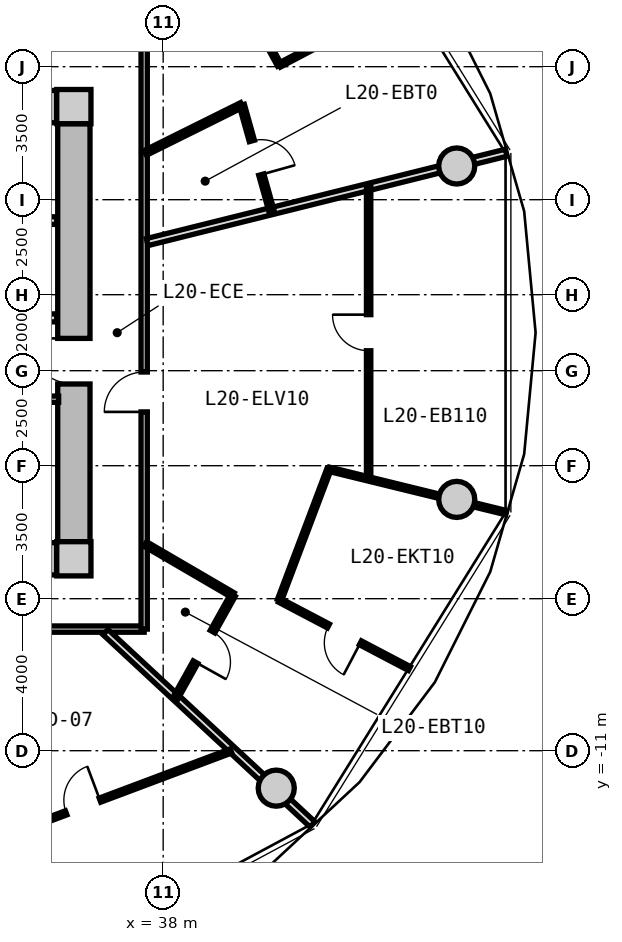
"""IFC4 building model, lengths in metres.
Left out: names, types, materials, properties, quantities, classifications, styles, units other than length and angle.
Written with IfcOpenShell. Run it as: python <this file> out.ifc"""

import sys

from ifc_helpers import new_model, si_unit, direction, frame, frame_2d, origin, origin_2d, place, context, subcontext, project, spatial, rectangle, circle, extrude, source, transform, mapped, element, fill, save


model = new_model("IFC4")
c1 = context("Model", 3, precision=1e-05, world=origin(), true_north=direction((0.0, 1.0)))
c2 = subcontext(c1, "Body", "Model", "MODEL_VIEW")
j1 = project(units=[si_unit("LENGTHUNIT", "METRE"), si_unit("PLANEANGLEUNIT", "RADIAN")], contexts=[c1])
p1 = place(None, origin())
s1 = spatial("IfcSite", under=j1, at=p1, CompositionType="ELEMENT")
p2 = place(p1, origin())
s2 = spatial("IfcBuilding", under=s1, at=p2, CompositionType="ELEMENT")
p3 = place(p2, frame((0.0, 0.0, 67.35)))
s3 = spatial("IfcBuildingStorey", under=s2, at=p3, CompositionType="ELEMENT", Elevation=67.35)
m1 = source(origin(), c2, "Body", "SweptSolid", [
    extrude(rectangle(XDim=0.9, YDim=0.9, at=origin_2d()), origin(), (0.0, 0.0, 1.0), 3.05),
])
for number, where, z_axis, x_axis in (
    (1, (35.65, -5.95, 0.0), (0.0, 0.0, 1.0), (1.0, 0.0, 0.0)),
    (2, (35.65, 5.95, 0.0), (0.0, 0.0, 1.0), (1.0, 0.0, 0.0)),
):
    element("IfcColumn", number, at=place(p3, frame(where, z_axis=z_axis, x_axis=x_axis)), inside=s3, PredefinedType="COLUMN", context=c2, shape_type="MappedRepresentation", body=[
        mapped(m1, transform((0.0, 0.0, 0.0), x_axis=(1.0, 0.0, 0.0), y_axis=(0.0, 1.0, 0.0), z_axis=(0.0, 0.0, 1.0), scale=1.0)),
    ])
m2 = source(origin(), c2, "Body", "SweptSolid", [
    extrude(rectangle(XDim=14.4, YDim=0.85, at=frame_2d((7.2, 0.0))), origin(), (0.0, 0.0, 1.0), 2.79),
])
for number, where, z_axis, x_axis in (
    (3, (20.8, 5.95, 0.0), (0.0, 0.0, 1.0), (1.0, 0.0, 0.0)),
    (4, (35.2, -5.95, 0.0), (0.0, 0.0, 1.0), (-1.0, 0.0, 0.0)),
):
    element("IfcWall", number, at=place(p3, frame(where, z_axis=z_axis, x_axis=x_axis)), inside=s3, PredefinedType="SHEAR", context=c2, shape_type="MappedRepresentation", body=[
        mapped(m2, transform((0.0, 0.0, 0.0), x_axis=(1.0, 0.0, 0.0), y_axis=(0.0, 1.0, 0.0), z_axis=(0.0, 0.0, 1.0), scale=1.0)),
    ])
m3 = source(origin(), c2, "Body", "SweptSolid", [
    extrude(rectangle(XDim=11.0, YDim=0.85, at=frame_2d((5.5, 0.0))), origin(), (0.0, 0.0, 1.0), 2.79),
])
p4 = place(p3, frame((35.65, 5.5, 0.0), z_axis=(0.0, 0.0, 1.0), x_axis=(0.0, -1.0, 0.0)))
e5 = element("IfcWall", 5, at=p4, inside=s3, PredefinedType="SHEAR", context=c2, shape_type="MappedRepresentation", body=[
    mapped(m3, transform((0.0, 0.0, 0.0), x_axis=(1.0, 0.0, 0.0), y_axis=(0.0, 1.0, 0.0), z_axis=(0.0, 0.0, 1.0), scale=1.0)),
])
p5 = place(p4, frame((5.65, 0.0, 0.0)))
e6 = element("IfcOpeningElement", 6, at=p5, cuts=e5, PredefinedType="OPENING", context=c2, shape_type="SweptSolid", body=[
    extrude(rectangle(XDim=1.2, YDim=2.15, at=frame_2d((0.6, 1.075))), frame((0.0, 0.435, 0.0), z_axis=(0.0, -1.0, 0.0), x_axis=(1.0, 0.0, 0.0)), (0.0, 0.0, 1.0), 0.87),
])
m4 = source(origin(), c2, "Body", "SweptSolid", [
    extrude(circle(Radius=0.475, at=origin_2d()), origin(), (0.0, 0.0, 1.0), 3.05),
])
for number, where, z_axis, x_axis in (
    (7, (45.725, 4.387, 0.0), (0.0, 0.0, 1.0), (1.0, 0.0, 0.0)),
    (8, (40.975, -11.985, 0.0), (0.0, 0.0, 1.0), (1.0, 0.0, 0.0)),
    (9, (45.725, -4.387, 0.0), (0.0, 0.0, 1.0), (1.0, 0.0, 0.0)),
):
    element("IfcColumn", number, at=place(p3, frame(where, z_axis=z_axis, x_axis=x_axis)), inside=s3, PredefinedType="COLUMN", context=c2, shape_type="MappedRepresentation", body=[
        mapped(m4, transform((0.0, 0.0, 0.0), x_axis=(1.0, 0.0, 0.0), y_axis=(0.0, 1.0, 0.0), z_axis=(0.0, 0.0, 1.0), scale=1.0)),
    ])
m5 = source(origin(), c2, "Body", "SweptSolid", [
    extrude(rectangle(XDim=3.2, YDim=0.2, at=frame_2d((1.6, 0.0))), origin(), (0.0, 0.0, 1.0), 2.775),
])
p6 = place(p3, frame((32.0, 2.95, 0.0), z_axis=(0.0, 0.0, 1.0), x_axis=(1.0, 0.0, 0.0)))
e10 = element("IfcWall", 10, at=p6, inside=s3, PredefinedType="PARTITIONING", context=c2, shape_type="MappedRepresentation", body=[
    mapped(m5, transform((0.0, 0.0, 0.0), x_axis=(1.0, 0.0, 0.0), y_axis=(0.0, 1.0, 0.0), z_axis=(0.0, 0.0, 1.0), scale=1.0)),
])
m6 = source(origin(), c2, "Body", "SweptSolid", [
    extrude(rectangle(XDim=6.66, YDim=0.21, at=frame_2d((3.33, 0.0))), origin(), (0.0, 0.0, 1.0), 2.775),
])
p7 = place(p3, frame((28.54, 0.39, 0.0), z_axis=(0.0, 0.0, 1.0), x_axis=(1.0, 0.0, 0.0)))
e11 = element("IfcWall", 11, at=p7, inside=s3, PredefinedType="PARTITIONING", context=c2, shape_type="MappedRepresentation", body=[
    mapped(m6, transform((0.0, 0.0, 0.0), x_axis=(1.0, 0.0, 0.0), y_axis=(0.0, 1.0, 0.0), z_axis=(0.0, 0.0, 1.0), scale=1.0)),
])
p8 = place(p7, frame((1.0, 0.0, 0.0)))
e12 = element("IfcOpeningElement", 12, at=p8, cuts=e11, PredefinedType="OPENING", context=c2, shape_type="SweptSolid", body=[
    extrude(rectangle(XDim=1.2, YDim=2.15, at=frame_2d((0.6, 1.075))), frame((0.0, 0.115, 0.0), z_axis=(0.0, -1.0, 0.0), x_axis=(1.0, 0.0, 0.0)), (0.0, 0.0, 1.0), 0.23),
])
m7 = source(origin(), c2, "Body", "SweptSolid", [
    extrude(rectangle(XDim=2.7, YDim=0.165, at=frame_2d((1.35, 0.0))), origin(), (0.0, 0.0, 1.0), 2.775),
])
p9 = place(p3, frame((32.55, -1.75, 0.0), z_axis=(0.0, 0.0, 1.0), x_axis=(1.0, 0.0, 0.0)))
e13 = element("IfcWall", 13, at=p9, inside=s3, PredefinedType="PARTITIONING", context=c2, shape_type="MappedRepresentation", body=[
    mapped(m7, transform((0.0, 0.0, 0.0), x_axis=(1.0, 0.0, 0.0), y_axis=(0.0, 1.0, 0.0), z_axis=(0.0, 0.0, 1.0), scale=1.0)),
])
p10 = place(p9, frame((0.222, 0.0, 0.0)))
e14 = element("IfcOpeningElement", 14, at=p10, cuts=e13, PredefinedType="OPENING", context=c2, shape_type="SweptSolid", body=[
    extrude(rectangle(XDim=0.925, YDim=2.1, at=frame_2d((0.462, 1.05))), frame((0.0, 0.093, 0.0), z_axis=(0.0, -1.0, 0.0), x_axis=(1.0, 0.0, 0.0)), (0.0, 0.0, 1.0), 0.185),
])
p11 = place(p9, frame((1.522, 0.0, 0.0)))
e15 = element("IfcOpeningElement", 15, at=p11, cuts=e13, PredefinedType="OPENING", context=c2, shape_type="SweptSolid", body=[
    extrude(rectangle(XDim=0.925, YDim=2.1, at=frame_2d((0.462, 1.05))), frame((0.0, 0.093, 0.0), z_axis=(0.0, -1.0, 0.0), x_axis=(1.0, 0.0, 0.0)), (0.0, 0.0, 1.0), 0.185),
])
m8 = source(origin(), c2, "Body", "SweptSolid", [
    extrude(rectangle(XDim=19.0, YDim=0.165, at=frame_2d((9.5, 0.0))), origin(), (0.0, 0.0, 1.0), 2.775),
])
p12 = place(p3, frame((37.5, -7.8, 0.0), z_axis=(0.0, 0.0, 1.0), x_axis=(-1.0, 0.0, 0.0)))
e16 = element("IfcWall", 16, at=p12, inside=s3, PredefinedType="PARTITIONING", context=c2, shape_type="MappedRepresentation", body=[
    mapped(m8, transform((0.0, 0.0, 0.0), x_axis=(1.0, 0.0, 0.0), y_axis=(0.0, 1.0, 0.0), z_axis=(0.0, 0.0, 1.0), scale=1.0)),
])
p13 = place(p12, frame((14.72, 0.0, 0.0)))
e17 = element("IfcOpeningElement", 17, at=p13, cuts=e16, PredefinedType="OPENING", context=c2, shape_type="SweptSolid", body=[
    extrude(rectangle(XDim=1.05, YDim=2.15, at=frame_2d((0.525, 1.075))), frame((0.0, 0.093, 0.0), z_axis=(0.0, -1.0, 0.0), x_axis=(1.0, 0.0, 0.0)), (0.0, 0.0, 1.0), 0.185),
])
p14 = place(p12, frame((4.847, 0.0, 0.0)))
e18 = element("IfcOpeningElement", 18, at=p14, cuts=e16, PredefinedType="OPENING", context=c2, shape_type="SweptSolid", body=[
    extrude(rectangle(XDim=1.05, YDim=2.15, at=frame_2d((0.525, 1.075))), frame((0.0, 0.093, 0.0), z_axis=(0.0, -1.0, 0.0), x_axis=(1.0, 0.0, 0.0)), (0.0, 0.0, 1.0), 0.185),
])
m9 = source(origin(), c2, "Body", "SweptSolid", [
    extrude(rectangle(XDim=15.6, YDim=0.165, at=frame_2d((7.8, 0.0))), origin(), (0.0, 0.0, 1.0), 2.775),
])
p15 = place(p3, frame((37.5, 7.8, 0.0), z_axis=(0.0, 0.0, 1.0), x_axis=(0.0, -1.0, 0.0)))
e19 = element("IfcWall", 19, at=p15, inside=s3, PredefinedType="PARTITIONING", context=c2, shape_type="MappedRepresentation", body=[
    mapped(m9, transform((0.0, 0.0, 0.0), x_axis=(1.0, 0.0, 0.0), y_axis=(0.0, 1.0, 0.0), z_axis=(0.0, 0.0, 1.0), scale=1.0)),
])
p16 = place(p15, frame((8.835, 0.0, 0.0)))
e20 = element("IfcOpeningElement", 20, at=p16, cuts=e19, PredefinedType="OPENING", context=c2, shape_type="SweptSolid", body=[
    extrude(rectangle(XDim=1.05, YDim=2.15, at=frame_2d((0.525, 1.075))), frame((0.0, 0.093, 0.0), z_axis=(0.0, -1.0, 0.0), x_axis=(1.0, 0.0, 0.0)), (0.0, 0.0, 1.0), 0.185),
])
m10 = source(origin(), c2, "Body", "SweptSolid", [
    extrude(rectangle(XDim=7.435, YDim=0.19, at=frame_2d((3.717, 0.0))), origin(), (0.0, 0.0, 1.0), 2.225),
])
p17 = place(p3, frame((36.483, -7.88, 0.0), z_axis=(0.0, 0.0, 1.0), x_axis=(0.732651956848, -0.680603489652, 0.0)))
e21 = element("IfcWall", 21, at=p17, inside=s3, PredefinedType="PARTITIONING", context=c2, shape_type="MappedRepresentation", body=[
    mapped(m10, transform((0.0, 0.0, 0.0), x_axis=(1.0, 0.0, 0.0), y_axis=(0.0, 1.0, 0.0), z_axis=(0.0, 0.0, 1.0), scale=1.0)),
])
m11 = source(origin(), c2, "Body", "SweptSolid", [
    extrude(rectangle(XDim=8.32, YDim=0.115, at=frame_2d((4.16, 0.0))), origin(), (0.0, 0.0, 1.0), 2.775),
])
p18 = place(p3, frame((31.997, -13.93, 0.0), z_axis=(0.0, 0.0, 1.0), x_axis=(0.936180763098, 0.351518959382, 0.0)))
e22 = element("IfcWall", 22, at=p18, inside=s3, PredefinedType="PARTITIONING", context=c2, shape_type="MappedRepresentation", body=[
    mapped(m11, transform((0.0, 0.0, 0.0), x_axis=(1.0, 0.0, 0.0), y_axis=(0.0, 1.0, 0.0), z_axis=(0.0, 0.0, 1.0), scale=1.0)),
])
p19 = place(p18, frame((3.685, 0.0, 0.0)))
e23 = element("IfcOpeningElement", 23, at=p19, cuts=e22, PredefinedType="OPENING", context=c2, shape_type="SweptSolid", body=[
    extrude(rectangle(XDim=0.95, YDim=2.1, at=frame_2d((0.475, 1.05))), frame((0.0, 0.067, 0.0), z_axis=(0.0, -1.0, 0.0), x_axis=(1.0, 0.0, 0.0)), (0.0, 0.0, 1.0), 0.135),
])
m12 = source(origin(), c2, "Body", "SweptSolid", [
    extrude(rectangle(XDim=9.737, YDim=0.19, at=frame_2d((4.869, 0.0))), origin(), (0.0, 0.0, 1.0), 2.225),
])
p20 = place(p3, frame((37.58, 2.385, 0.0), z_axis=(0.0, 0.0, 1.0), x_axis=(0.970392716238, 0.241532557375, 0.0)))
e24 = element("IfcWall", 24, at=p20, inside=s3, PredefinedType="PARTITIONING", context=c2, shape_type="MappedRepresentation", body=[
    mapped(m12, transform((0.0, 0.0, 0.0), x_axis=(1.0, 0.0, 0.0), y_axis=(0.0, 1.0, 0.0), z_axis=(0.0, 0.0, 1.0), scale=1.0)),
])
m13 = source(origin(), c2, "Body", "SweptSolid", [
    extrude(rectangle(XDim=7.709, YDim=0.115, at=frame_2d((3.855, 0.0))), origin(), (0.0, 0.0, 1.0), 2.775),
])
p21 = place(p3, frame((43.406, -3.855, 0.0), z_axis=(0.0, 0.0, 1.0), x_axis=(0.0, 1.0, 0.0)))
e25 = element("IfcWall", 25, at=p21, inside=s3, PredefinedType="PARTITIONING", context=c2, shape_type="MappedRepresentation", body=[
    mapped(m13, transform((0.0, 0.0, 0.0), x_axis=(1.0, 0.0, 0.0), y_axis=(0.0, 1.0, 0.0), z_axis=(0.0, 0.0, 1.0), scale=1.0)),
])
p22 = place(p21, frame((3.38, 0.0, 0.0)))
e26 = element("IfcOpeningElement", 26, at=p22, cuts=e25, PredefinedType="OPENING", context=c2, shape_type="SweptSolid", body=[
    extrude(rectangle(XDim=0.95, YDim=2.1, at=frame_2d((0.475, 1.05))), frame((0.0, 0.067, 0.0), z_axis=(0.0, -1.0, 0.0), x_axis=(1.0, 0.0, 0.0)), (0.0, 0.0, 1.0), 0.135),
])
m14 = source(origin(), c2, "Body", "SweptSolid", [
    extrude(rectangle(XDim=4.803, YDim=0.115, at=frame_2d((2.401, 0.0))), origin(), (0.0, 0.0, 1.0), 2.225),
])
p23 = place(p3, frame((42.364, -3.594, 0.0), z_axis=(0.0, 0.0, 1.0), x_axis=(0.97129155908, -0.237892217736, 0.0)))
e27 = element("IfcWall", 27, at=p23, inside=s3, PredefinedType="PARTITIONING", context=c2, shape_type="MappedRepresentation", body=[
    mapped(m14, transform((0.0, 0.0, 0.0), x_axis=(1.0, 0.0, 0.0), y_axis=(0.0, 1.0, 0.0), z_axis=(0.0, 0.0, 1.0), scale=1.0)),
])
m15 = source(origin(), c2, "Body", "SweptSolid", [
    extrude(rectangle(XDim=2.669, YDim=0.14, at=frame_2d((1.335, 0.0))), origin(), (0.0, 0.0, 1.0), 2.775),
])
p24 = place(p3, frame((37.53, -5.561, 0.0), z_axis=(0.0, 0.0, 1.0), x_axis=(0.86369928178, -0.50400749067, 0.0)))
e28 = element("IfcWall", 28, at=p24, inside=s3, PredefinedType="PARTITIONING", context=c2, shape_type="MappedRepresentation", body=[
    mapped(m15, transform((0.0, 0.0, 0.0), x_axis=(1.0, 0.0, 0.0), y_axis=(0.0, 1.0, 0.0), z_axis=(0.0, 0.0, 1.0), scale=1.0)),
])
m16 = source(origin(), c2, "Body", "SweptSolid", [
    extrude(rectangle(XDim=3.121, YDim=0.14, at=frame_2d((1.561, 0.0))), origin(), (0.0, 0.0, 1.0), 2.775),
])
p25 = place(p3, frame((39.836, -6.906, 0.0), z_axis=(0.0, 0.0, 1.0), x_axis=(-0.487302357327, -0.873233309342, 0.0)))
e29 = element("IfcWall", 29, at=p25, inside=s3, PredefinedType="PARTITIONING", context=c2, shape_type="MappedRepresentation", body=[
    mapped(m16, transform((0.0, 0.0, 0.0), x_axis=(1.0, 0.0, 0.0), y_axis=(0.0, 1.0, 0.0), z_axis=(0.0, 0.0, 1.0), scale=1.0)),
])
p26 = place(p25, frame((1.101, 0.0, 0.0)))
e30 = element("IfcOpeningElement", 30, at=p26, cuts=e29, PredefinedType="OPENING", context=c2, shape_type="SweptSolid", body=[
    extrude(rectangle(XDim=0.92, YDim=2.1, at=frame_2d((0.46, 1.05))), frame((0.0, 0.08, 0.0), z_axis=(0.0, -1.0, 0.0), x_axis=(1.0, 0.0, 0.0)), (0.0, 0.0, 1.0), 0.16),
])
m17 = source(origin(), c2, "Body", "SweptSolid", [
    extrude(rectangle(XDim=3.864, YDim=0.115, at=frame_2d((1.932, 0.0))), origin(), (0.0, 0.0, 1.0), 2.775),
])
p27 = place(p3, frame((41.06, -7.041, 0.0), z_axis=(0.0, 0.0, 1.0), x_axis=(0.885194959803, -0.465220252289, 0.0)))
e31 = element("IfcWall", 31, at=p27, inside=s3, PredefinedType="PARTITIONING", context=c2, shape_type="MappedRepresentation", body=[
    mapped(m17, transform((0.0, 0.0, 0.0), x_axis=(1.0, 0.0, 0.0), y_axis=(0.0, 1.0, 0.0), z_axis=(0.0, 0.0, 1.0), scale=1.0)),
])
p28 = place(p27, frame((1.457, 0.0, 0.0)))
e32 = element("IfcOpeningElement", 32, at=p28, cuts=e31, PredefinedType="OPENING", context=c2, shape_type="SweptSolid", body=[
    extrude(rectangle(XDim=0.95, YDim=2.1, at=frame_2d((0.475, 1.05))), frame((0.0, 0.067, 0.0), z_axis=(0.0, -1.0, 0.0), x_axis=(1.0, 0.0, 0.0)), (0.0, 0.0, 1.0), 0.135),
])
m18 = source(origin(), c2, "Body", "SweptSolid", [
    extrude(rectangle(XDim=3.685, YDim=0.115, at=frame_2d((1.843, 0.0))), origin(), (0.0, 0.0, 1.0), 2.775),
])
p29 = place(p3, frame((41.06, -7.041, 0.0), z_axis=(0.0, 0.0, 1.0), x_axis=(0.353503632997, 0.935433151785, 0.0)))
e33 = element("IfcWall", 33, at=p29, inside=s3, PredefinedType="PARTITIONING", context=c2, shape_type="MappedRepresentation", body=[
    mapped(m18, transform((0.0, 0.0, 0.0), x_axis=(1.0, 0.0, 0.0), y_axis=(0.0, 1.0, 0.0), z_axis=(0.0, 0.0, 1.0), scale=1.0)),
])
m19 = source(origin(), c2, "Body", "SweptSolid", [
    extrude(rectangle(XDim=2.834, YDim=0.14, at=frame_2d((1.417, 0.0))), origin(), (0.0, 0.0, 1.0), 2.775),
])
p30 = place(p3, frame((37.53, 4.732, 0.0), z_axis=(0.0, 0.0, 1.0), x_axis=(0.895681174462, 0.444696788513, 0.0)))
e34 = element("IfcWall", 34, at=p30, inside=s3, PredefinedType="PARTITIONING", context=c2, shape_type="MappedRepresentation", body=[
    mapped(m19, transform((0.0, 0.0, 0.0), x_axis=(1.0, 0.0, 0.0), y_axis=(0.0, 1.0, 0.0), z_axis=(0.0, 0.0, 1.0), scale=1.0)),
])
m20 = source(origin(), c2, "Body", "SweptSolid", [
    extrude(rectangle(XDim=2.885, YDim=0.14, at=frame_2d((1.442, 0.0))), origin(), (0.0, 0.0, 1.0), 2.775),
])
p31 = place(p3, frame((40.069, 5.992, 0.0), z_axis=(0.0, 0.0, 1.0), x_axis=(0.269799431837, -0.962916541856, 0.0)))
e35 = element("IfcWall", 35, at=p31, inside=s3, PredefinedType="PARTITIONING", context=c2, shape_type="MappedRepresentation", body=[
    mapped(m20, transform((0.0, 0.0, 0.0), x_axis=(1.0, 0.0, 0.0), y_axis=(0.0, 1.0, 0.0), z_axis=(0.0, 0.0, 1.0), scale=1.0)),
])
p32 = place(p31, frame((0.982, 0.0, 0.0)))
e36 = element("IfcOpeningElement", 36, at=p32, cuts=e35, PredefinedType="OPENING", context=c2, shape_type="SweptSolid", body=[
    extrude(rectangle(XDim=0.92, YDim=2.1, at=frame_2d((0.46, 1.05))), frame((0.0, 0.08, 0.0), z_axis=(0.0, -1.0, 0.0), x_axis=(1.0, 0.0, 0.0)), (0.0, 0.0, 1.0), 0.16),
])
p33 = place(p3, frame((41.06, 7.041, 0.0), z_axis=(0.0, 0.0, 1.0), x_axis=(0.885194959803, 0.465220252289, 0.0)))
e37 = element("IfcWall", 37, at=p33, inside=s3, PredefinedType="PARTITIONING", context=c2, shape_type="MappedRepresentation", body=[
    mapped(m17, transform((0.0, 0.0, 0.0), x_axis=(1.0, 0.0, 0.0), y_axis=(0.0, 1.0, 0.0), z_axis=(0.0, 0.0, 1.0), scale=1.0)),
])
m21 = source(origin(), c2, "Body", "SweptSolid", [
    extrude(rectangle(XDim=3.888, YDim=0.115, at=frame_2d((1.944, 0.0))), origin(), (0.0, 0.0, 1.0), 2.775),
])
p34 = place(p3, frame((41.06, 7.041, 0.0), z_axis=(0.0, 0.0, 1.0), x_axis=(-0.480382482853, 0.877059103007, 0.0)))
e38 = element("IfcWall", 38, at=p34, inside=s3, PredefinedType="PARTITIONING", context=c2, shape_type="MappedRepresentation", body=[
    mapped(m21, transform((0.0, 0.0, 0.0), x_axis=(1.0, 0.0, 0.0), y_axis=(0.0, 1.0, 0.0), z_axis=(0.0, 0.0, 1.0), scale=1.0)),
])
p35 = place(p34, frame((1.469, 0.0, 0.0)))
e39 = element("IfcOpeningElement", 39, at=p35, cuts=e38, PredefinedType="OPENING", context=c2, shape_type="SweptSolid", body=[
    extrude(rectangle(XDim=0.95, YDim=2.1, at=frame_2d((0.475, 1.05))), frame((0.0, 0.067, 0.0), z_axis=(0.0, -1.0, 0.0), x_axis=(1.0, 0.0, 0.0)), (0.0, 0.0, 1.0), 0.135),
])
m22 = source(origin(), c2, "Body", "SweptSolid", [
    extrude(rectangle(XDim=1.2, YDim=2.15, at=frame_2d((0.6, 1.075))), frame((0.0, 0.025, 0.0), z_axis=(0.0, -1.0, 0.0), x_axis=(1.0, 0.0, 0.0)), (0.0, 0.0, 1.0), 0.05),
])
p36 = place(p5, frame((1.2, 0.0, 0.0), z_axis=(0.0, 0.0, 1.0), x_axis=(-1.0, 0.0, 0.0)))
e40 = element("IfcDoor", 40, at=p36, inside=s3, OperationType="SINGLE_SWING_RIGHT", PredefinedType="DOOR", context=c2, shape_type="MappedRepresentation", body=[
    mapped(m22, transform((0.0, 0.0, 0.0), x_axis=(1.0, 0.0, 0.0), y_axis=(0.0, 1.0, 0.0), z_axis=(0.0, 0.0, 1.0), scale=1.0)),
])
fill(e6, e40)
m23 = source(origin(), c2, "Body", "SweptSolid", [
    extrude(rectangle(XDim=0.95, YDim=2.1, at=frame_2d((0.475, 1.05))), frame((0.0, 0.025, 0.0), z_axis=(0.0, -1.0, 0.0), x_axis=(1.0, 0.0, 0.0)), (0.0, 0.0, 1.0), 0.05),
])
p37 = place(p19, origin())
e41 = element("IfcDoor", 41, at=p37, inside=s3, OperationType="SINGLE_SWING_RIGHT", PredefinedType="DOOR", context=c2, shape_type="MappedRepresentation", body=[
    mapped(m23, transform((0.0, 0.0, 0.0), x_axis=(1.0, 0.0, 0.0), y_axis=(0.0, 1.0, 0.0), z_axis=(0.0, 0.0, 1.0), scale=1.0)),
])
fill(e23, e41)
m24 = source(origin(), c2, "Body", "SweptSolid", [
    extrude(rectangle(XDim=1.05, YDim=2.15, at=frame_2d((0.525, 1.075))), frame((0.0, 0.025, 0.0), z_axis=(0.0, -1.0, 0.0), x_axis=(1.0, 0.0, 0.0)), (0.0, 0.0, 1.0), 0.05),
])
p38 = place(p16, frame((1.05, 0.0, 0.0), z_axis=(0.0, 0.0, 1.0), x_axis=(-1.0, 0.0, 0.0)))
e42 = element("IfcDoor", 42, at=p38, inside=s3, OperationType="SINGLE_SWING_LEFT", PredefinedType="DOOR", context=c2, shape_type="MappedRepresentation", body=[
    mapped(m24, transform((0.0, 0.0, 0.0), x_axis=(1.0, 0.0, 0.0), y_axis=(0.0, 1.0, 0.0), z_axis=(0.0, 0.0, 1.0), scale=1.0)),
])
fill(e20, e42)
m25 = source(origin(), c2, "Body", "SweptSolid", [
    extrude(rectangle(XDim=0.92, YDim=2.1, at=frame_2d((0.46, 1.05))), frame((0.0, 0.025, 0.0), z_axis=(0.0, -1.0, 0.0), x_axis=(1.0, 0.0, 0.0)), (0.0, 0.0, 1.0), 0.05),
])
p39 = place(p26, origin())
e43 = element("IfcDoor", 43, at=p39, inside=s3, OperationType="SINGLE_SWING_RIGHT", PredefinedType="DOOR", context=c2, shape_type="MappedRepresentation", body=[
    mapped(m25, transform((0.0, 0.0, 0.0), x_axis=(1.0, 0.0, 0.0), y_axis=(0.0, 1.0, 0.0), z_axis=(0.0, 0.0, 1.0), scale=1.0)),
])
fill(e30, e43)
p40 = place(p28, frame((0.95, 0.0, 0.0), z_axis=(0.0, 0.0, 1.0), x_axis=(-1.0, 0.0, 0.0)))
e44 = element("IfcDoor", 44, at=p40, inside=s3, OperationType="SINGLE_SWING_LEFT", PredefinedType="DOOR", context=c2, shape_type="MappedRepresentation", body=[
    mapped(m23, transform((0.0, 0.0, 0.0), x_axis=(1.0, 0.0, 0.0), y_axis=(0.0, 1.0, 0.0), z_axis=(0.0, 0.0, 1.0), scale=1.0)),
])
fill(e32, e44)
p41 = place(p22, origin())
e45 = element("IfcDoor", 45, at=p41, inside=s3, OperationType="SINGLE_SWING_RIGHT", PredefinedType="DOOR", context=c2, shape_type="MappedRepresentation", body=[
    mapped(m23, transform((0.0, 0.0, 0.0), x_axis=(1.0, 0.0, 0.0), y_axis=(0.0, 1.0, 0.0), z_axis=(0.0, 0.0, 1.0), scale=1.0)),
])
fill(e26, e45)
p42 = place(p32, origin())
e46 = element("IfcDoor", 46, at=p42, inside=s3, OperationType="SINGLE_SWING_RIGHT", PredefinedType="DOOR", context=c2, shape_type="MappedRepresentation", body=[
    mapped(m25, transform((0.0, 0.0, 0.0), x_axis=(1.0, 0.0, 0.0), y_axis=(0.0, 1.0, 0.0), z_axis=(0.0, 0.0, 1.0), scale=1.0)),
])
fill(e36, e46)
save(model, sys.argv[1])
